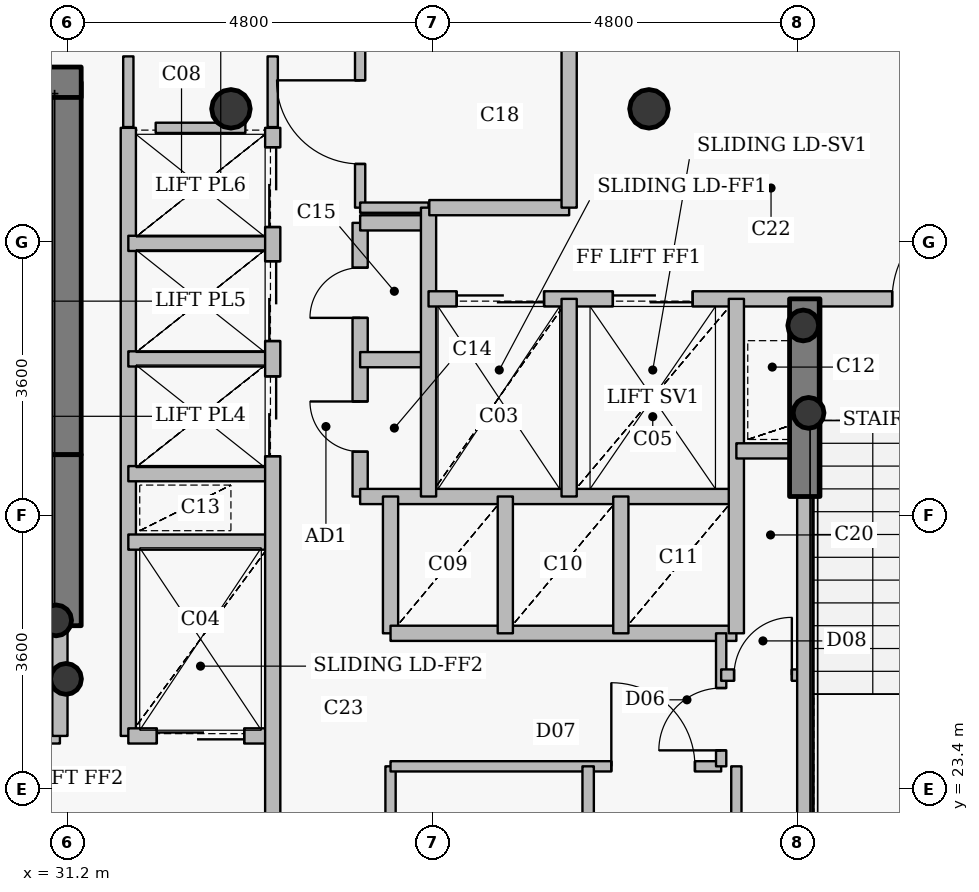
"""IFC4 building model, lengths in metres.
Left out: names, types, materials, properties, quantities, classifications, styles, units other than length and angle.
Written with IfcOpenShell. Run it as: python <this file> out.ifc"""

import sys

from ifc_helpers import new_model, si_unit, direction, frame, frame_2d, origin, origin_2d, place, context, subcontext, project, spatial, rectangle, hollow_circle, extrude, source, transform, mapped, element, fill, save


model = new_model("IFC4")
c1 = context("Model", 3, precision=1e-05, world=origin(), true_north=direction((0.0, 1.0)))
c2 = subcontext(c1, "Body", "Model", "MODEL_VIEW")
j1 = project(units=[si_unit("LENGTHUNIT", "METRE"), si_unit("PLANEANGLEUNIT", "RADIAN")], contexts=[c1])
p1 = place(None, origin())
s1 = spatial("IfcSite", under=j1, at=p1, CompositionType="ELEMENT")
p2 = place(p1, origin())
s2 = spatial("IfcBuilding", under=s1, at=p2, CompositionType="ELEMENT")
p3 = place(p2, frame((0.0, 0.0, 210.3)))
s3 = spatial("IfcBuildingStorey", under=s2, at=p3, CompositionType="ELEMENT", Elevation=210.3)
for number, where, z_axis, x_axis in (
    (1, (38.85, 32.35, 0.0), (0.0, 0.0, 1.0), (1.0, 0.0, 0.0)),
    (2, (33.35, 32.35, 0.0), (0.0, 0.0, 1.0), (1.0, 0.0, 0.0)),
):
    element("IfcColumn", number, at=place(p3, frame(where, z_axis=z_axis, x_axis=x_axis)), inside=s3, PredefinedType="COLUMN", context=c2, shape_type="SweptSolid", body=[
        extrude(hollow_circle(Radius=0.254, WallThickness=0.02, at=origin_2d()), origin(), (0.0, 0.0, 1.0), 3.75),
    ])
p4 = place(p3, frame((31.18, 27.8, 0.0), z_axis=(0.0, 0.0, 1.0), x_axis=(0.0, 1.0, 0.0)))
e3 = element("IfcWall", 3, at=p4, inside=s3, PredefinedType="SHEAR", context=c2, shape_type="SweptSolid", body=[
    extrude(rectangle(XDim=4.9, YDim=0.4, at=frame_2d((2.45, 0.0))), origin(), (0.0, 0.0, 1.0), 3.75),
])
p5 = place(p3, frame((27.28, 32.7, 0.0), z_axis=(0.0, 0.0, 1.0), x_axis=(1.0, 0.0, 0.0)))
e4 = element("IfcWall", 4, at=p5, inside=s3, PredefinedType="SHEAR", context=c2, shape_type="SweptSolid", body=[
    extrude(rectangle(XDim=4.1, YDim=0.4, at=frame_2d((2.05, 0.0))), origin(), (0.0, 0.0, 1.0), 3.75),
])
for number, where, z_axis, x_axis in (
    (5, (31.05, 25.62, 0.0), (0.0, 0.0, 1.0), (1.0, 0.0, 0.0)),
    (6, (31.18, 24.85, 0.0), (0.0, 0.0, 1.0), (1.0, 0.0, 0.0)),
    (7, (40.95, 28.35, 0.0), (0.0, 0.0, 1.0), (1.0, 0.0, 0.0)),
    (8, (40.88, 29.5, 0.0), (0.0, 0.0, 1.0), (1.0, 0.0, 0.0)),
):
    element("IfcColumn", number, at=place(p3, frame(where, z_axis=z_axis, x_axis=x_axis)), inside=s3, PredefinedType="COLUMN", context=c2, shape_type="SweptSolid", body=[
        extrude(hollow_circle(Radius=0.203, WallThickness=0.016, at=origin_2d()), origin(), (0.0, 0.0, 1.0), 3.75),
    ])
p6 = place(p3, frame((31.18, 25.55, 0.0), z_axis=(0.0, 0.0, 1.0), x_axis=(0.0, 1.0, 0.0)))
e9 = element("IfcWall", 9, at=p6, inside=s3, PredefinedType="SHEAR", context=c2, shape_type="SweptSolid", body=[
    extrude(rectangle(XDim=2.25, YDim=0.4, at=frame_2d((1.125, 0.0))), origin(), (0.0, 0.0, 1.0), 3.1),
])
p7 = place(p3, frame((40.9, 27.25, 0.0), z_axis=(0.0, 0.0, 1.0), x_axis=(0.0, 1.0, 0.0)))
e10 = element("IfcWall", 10, at=p7, inside=s3, PredefinedType="SHEAR", context=c2, shape_type="SweptSolid", body=[
    extrude(rectangle(XDim=2.6, YDim=0.4, at=frame_2d((1.3, 0.0))), origin(), (0.0, 0.0, 1.0), 3.1),
])
p8 = place(p3, frame((27.56, 24.1, 0.0), z_axis=(0.0, 0.0, 1.0), x_axis=(1.0, 0.0, 0.0)))
e11 = element("IfcWall", 11, at=p8, inside=s3, PredefinedType="PARTITIONING", context=c2, shape_type="SweptSolid", body=[
    extrude(rectangle(XDim=3.54, YDim=0.2, at=frame_2d((1.77, 0.0))), origin(), (0.0, 0.0, 1.0), 3.5),
])
p9 = place(p8, frame((1.17, 0.0, 0.0)))
e12 = element("IfcOpeningElement", 12, at=p9, cuts=e11, PredefinedType="OPENING", context=c2, shape_type="SweptSolid", body=[
    extrude(rectangle(XDim=1.2, YDim=2.15, at=origin_2d()), frame((0.6, 0.11, 1.075), z_axis=(0.0, -1.0, 0.0), x_axis=(1.0, 0.0, 0.0)), (0.0, 0.0, 1.0), 0.22),
])
p10 = place(p3, frame((31.1, 24.1, 0.0), z_axis=(0.0, 0.0, 1.0), x_axis=(0.0, 1.0, 0.0)))
e13 = element("IfcWall", 13, at=p10, inside=s3, PredefinedType="PARTITIONING", context=c2, shape_type="SweptSolid", body=[
    extrude(rectangle(XDim=1.44, YDim=0.2, at=frame_2d((0.72, 0.0))), origin(), (0.0, 0.0, 1.0), 3.5),
])
p11 = place(p3, frame((32.0, 24.1, 0.0), z_axis=(0.0, 0.0, 1.0), x_axis=(0.0, 1.0, 0.0)))
e14 = element("IfcWall", 14, at=p11, inside=s3, PredefinedType="PARTITIONING", context=c2, shape_type="SweptSolid", body=[
    extrude(rectangle(XDim=8.0, YDim=0.2, at=frame_2d((4.0, 0.0))), origin(), (0.0, 0.0, 1.0), 3.5),
])
p12 = place(p3, frame((32.0, 24.1, 0.0), z_axis=(0.0, 0.0, 1.0), x_axis=(1.0, 0.0, 0.0)))
e15 = element("IfcWall", 15, at=p12, inside=s3, PredefinedType="PARTITIONING", context=c2, shape_type="SweptSolid", body=[
    extrude(rectangle(XDim=1.9, YDim=0.2, at=frame_2d((0.95, 0.0))), origin(), (0.0, 0.0, 1.0), 3.085),
])
p13 = place(p12, frame((0.375, 0.0, 0.0)))
e16 = element("IfcOpeningElement", 16, at=p13, cuts=e15, PredefinedType="OPENING", context=c2, shape_type="SweptSolid", body=[
    extrude(rectangle(XDim=1.15, YDim=2.15, at=origin_2d()), frame((0.575, 0.11, 1.075), z_axis=(0.0, -1.0, 0.0), x_axis=(1.0, 0.0, 0.0)), (0.0, 0.0, 1.0), 0.22),
])
for number, where, z_axis, x_axis in (
    (17, (32.0, 26.65, 0.0), (0.0, 0.0, 1.0), (1.0, 0.0, 0.0)),
    (18, (32.0, 27.55, 0.0), (0.0, 0.0, 1.0), (1.0, 0.0, 0.0)),
    (19, (32.0, 29.06, 0.0), (0.0, 0.0, 1.0), (1.0, 0.0, 0.0)),
    (20, (32.0, 30.58, 0.0), (0.0, 0.0, 1.0), (1.0, 0.0, 0.0)),
):
    element("IfcWall", number, at=place(p3, frame(where, z_axis=z_axis, x_axis=x_axis)), inside=s3, PredefinedType="PARTITIONING", context=c2, shape_type="SweptSolid", body=[
        extrude(rectangle(XDim=1.9, YDim=0.2, at=frame_2d((0.95, 0.0))), origin(), (0.0, 0.0, 1.0), 3.085),
    ])
p14 = place(p3, frame((33.9, 20.7, 0.0), z_axis=(0.0, 0.0, 1.0), x_axis=(0.0, 1.0, 0.0)))
e21 = element("IfcWall", 21, at=p14, inside=s3, PredefinedType="PARTITIONING", context=c2, shape_type="SweptSolid", body=[
    extrude(rectangle(XDim=11.4, YDim=0.2, at=frame_2d((5.7, 0.0))), origin(), (0.0, 0.0, 1.0), 3.085),
])
p15 = place(p14, frame((7.08, 0.0, 0.0)))
e22 = element("IfcOpeningElement", 22, at=p15, cuts=e21, PredefinedType="OPENING", context=c2, shape_type="SweptSolid", body=[
    extrude(rectangle(XDim=1.05, YDim=2.15, at=origin_2d()), frame((0.525, 0.11, 1.075), z_axis=(0.0, -1.0, 0.0), x_axis=(1.0, 0.0, 0.0)), (0.0, 0.0, 1.0), 0.22),
])
p16 = place(p14, frame((8.595, 0.0, 0.0)))
e23 = element("IfcOpeningElement", 23, at=p16, cuts=e21, PredefinedType="OPENING", context=c2, shape_type="SweptSolid", body=[
    extrude(rectangle(XDim=1.05, YDim=2.15, at=origin_2d()), frame((0.525, 0.11, 1.075), z_axis=(0.0, -1.0, 0.0), x_axis=(1.0, 0.0, 0.0)), (0.0, 0.0, 1.0), 0.22),
])
p17 = place(p14, frame((10.095, 0.0, 0.0)))
e24 = element("IfcOpeningElement", 24, at=p17, cuts=e21, PredefinedType="OPENING", context=c2, shape_type="SweptSolid", body=[
    extrude(rectangle(XDim=1.05, YDim=2.15, at=origin_2d()), frame((0.525, 0.11, 1.075), z_axis=(0.0, -1.0, 0.0), x_axis=(1.0, 0.0, 0.0)), (0.0, 0.0, 1.0), 0.22),
])
p18 = place(p3, frame((35.05, 27.25, 0.0), z_axis=(0.0, 0.0, 1.0), x_axis=(0.0, 1.0, 0.0)))
e25 = element("IfcWall", 25, at=p18, inside=s3, PredefinedType="PARTITIONING", context=c2, shape_type="SweptSolid", body=[
    extrude(rectangle(XDim=3.6, YDim=0.2, at=frame_2d((1.8, 0.0))), origin(), (0.0, 0.0, 1.0), 3.5),
])
p19 = place(p18, frame((0.59, 0.0, 0.0)))
e26 = element("IfcOpeningElement", 26, at=p19, cuts=e25, PredefinedType="OPENING", context=c2, shape_type="SweptSolid", body=[
    extrude(rectangle(XDim=0.66, YDim=2.05, at=origin_2d()), frame((0.33, 0.11, 1.025), z_axis=(0.0, -1.0, 0.0), x_axis=(1.0, 0.0, 0.0)), (0.0, 0.0, 1.0), 0.22),
])
p20 = place(p18, frame((2.35, 0.0, 0.0)))
e27 = element("IfcOpeningElement", 27, at=p20, cuts=e25, PredefinedType="OPENING", context=c2, shape_type="SweptSolid", body=[
    extrude(rectangle(XDim=0.66, YDim=2.05, at=origin_2d()), frame((0.33, 0.11, 1.025), z_axis=(0.0, -1.0, 0.0), x_axis=(1.0, 0.0, 0.0)), (0.0, 0.0, 1.0), 0.22),
])
p21 = place(p3, frame((35.05, 27.25, 0.0), z_axis=(0.0, 0.0, 1.0), x_axis=(1.0, 0.0, 0.0)))
e28 = element("IfcWall", 28, at=p21, inside=s3, PredefinedType="PARTITIONING", context=c2, shape_type="SweptSolid", body=[
    extrude(rectangle(XDim=4.95, YDim=0.2, at=frame_2d((2.475, 0.0))), origin(), (0.0, 0.0, 1.0), 3.085),
])
for number, where, z_axis, x_axis in (
    (29, (35.05, 29.05, 0.0), (0.0, 0.0, 1.0), (1.0, 0.0, 0.0)),
    (30, (35.05, 30.85, 0.0), (0.0, 0.0, 1.0), (1.0, 0.0, 0.0)),
):
    element("IfcWall", number, at=place(p3, frame(where, z_axis=z_axis, x_axis=x_axis)), inside=s3, PredefinedType="PARTITIONING", context=c2, shape_type="SweptSolid", body=[
        extrude(rectangle(XDim=0.9, YDim=0.2, at=frame_2d((0.45, 0.0))), origin(), (0.0, 0.0, 1.0), 3.5),
    ])
p22 = place(p3, frame((35.05, 31.05, 0.0), z_axis=(0.0, 0.0, 1.0), x_axis=(0.0, 1.0, 0.0)))
e31 = element("IfcWall", 31, at=p22, inside=s3, PredefinedType="PARTITIONING", context=c2, shape_type="SweptSolid", body=[
    extrude(rectangle(XDim=2.25, YDim=0.2, at=frame_2d((1.125, 0.0))), origin(), (0.0, 0.0, 1.0), 3.085),
])
p23 = place(p3, frame((35.05, 31.05, 0.0), z_axis=(0.0, 0.0, 1.0), x_axis=(1.0, 0.0, 0.0)))
e32 = element("IfcWall", 32, at=p23, inside=s3, PredefinedType="PARTITIONING", context=c2, shape_type="SweptSolid", body=[
    extrude(rectangle(XDim=0.9, YDim=0.2, at=frame_2d((0.45, 0.0))), origin(), (0.0, 0.0, 1.0), 3.5),
])
p24 = place(p3, frame((35.45, 20.7, 0.0), z_axis=(0.0, 0.0, 1.0), x_axis=(0.0, 1.0, 0.0)))
e33 = element("IfcWall", 33, at=p24, inside=s3, PredefinedType="PARTITIONING", context=c2, shape_type="SweptSolid", body=[
    extrude(rectangle(XDim=3.0, YDim=0.135, at=frame_2d((1.5, 0.0))), origin(), (0.0, 0.0, 1.0), 3.085),
])
p25 = place(p3, frame((35.45, 23.7, 0.0), z_axis=(0.0, 0.0, 1.0), x_axis=(1.0, 0.0, 0.0)))
e34 = element("IfcWall", 34, at=p25, inside=s3, PredefinedType="PARTITIONING", context=c2, shape_type="SweptSolid", body=[
    extrude(rectangle(XDim=4.35, YDim=0.135, at=frame_2d((2.175, 0.0))), origin(), (0.0, 0.0, 1.0), 3.085),
])
p26 = place(p25, frame((1.625, 0.0, 0.0)))
e35 = element("IfcOpeningElement", 35, at=p26, cuts=e34, PredefinedType="OPENING", context=c2, shape_type="SweptSolid", body=[
    extrude(rectangle(XDim=1.1, YDim=2.15, at=origin_2d()), frame((0.55, 0.078, 1.075), z_axis=(0.0, -1.0, 0.0), x_axis=(1.0, 0.0, 0.0)), (0.0, 0.0, 1.0), 0.155),
])
p27 = place(p3, frame((35.45, 25.45, 0.0), z_axis=(0.0, 0.0, 1.0), x_axis=(0.0, 1.0, 0.0)))
e36 = element("IfcWall", 36, at=p27, inside=s3, PredefinedType="PARTITIONING", context=c2, shape_type="SweptSolid", body=[
    extrude(rectangle(XDim=1.8, YDim=0.2, at=frame_2d((0.9, 0.0))), origin(), (0.0, 0.0, 1.0), 3.5),
])
p28 = place(p3, frame((35.45, 25.45, 0.0), z_axis=(0.0, 0.0, 1.0), x_axis=(1.0, 0.0, 0.0)))
e37 = element("IfcWall", 37, at=p28, inside=s3, PredefinedType="PARTITIONING", context=c2, shape_type="SweptSolid", body=[
    extrude(rectangle(XDim=4.55, YDim=0.2, at=frame_2d((2.275, 0.0))), origin(), (0.0, 0.0, 1.0), 3.085),
])
p29 = place(p3, frame((35.95, 27.25, 0.0), z_axis=(0.0, 0.0, 1.0), x_axis=(0.0, 1.0, 0.0)))
e38 = element("IfcWall", 38, at=p29, inside=s3, PredefinedType="PARTITIONING", context=c2, shape_type="SweptSolid", body=[
    extrude(rectangle(XDim=3.8, YDim=0.2, at=frame_2d((1.9, 0.0))), origin(), (0.0, 0.0, 1.0), 3.5),
])
p30 = place(p3, frame((35.95, 29.85, 0.0), z_axis=(0.0, 0.0, 1.0), x_axis=(1.0, 0.0, 0.0)))
e39 = element("IfcWall", 39, at=p30, inside=s3, PredefinedType="PARTITIONING", context=c2, shape_type="SweptSolid", body=[
    extrude(rectangle(XDim=8.49, YDim=0.2, at=frame_2d((4.245, 0.0))), origin(), (0.0, 0.0, 1.0), 3.085),
])
p31 = place(p30, frame((6.1, 0.0, 0.0)))
e40 = element("IfcOpeningElement", 40, at=p31, cuts=e39, PredefinedType="OPENING", context=c2, shape_type="SweptSolid", body=[
    extrude(rectangle(XDim=1.2, YDim=2.15, at=origin_2d()), frame((0.6, 0.11, 1.075), z_axis=(0.0, -1.0, 0.0), x_axis=(1.0, 0.0, 0.0)), (0.0, 0.0, 1.0), 0.22),
])
p32 = place(p30, frame((0.37, 0.0, 0.0)))
e41 = element("IfcOpeningElement", 41, at=p32, cuts=e39, PredefinedType="OPENING", context=c2, shape_type="SweptSolid", body=[
    extrude(rectangle(XDim=1.15, YDim=2.15, at=origin_2d()), frame((0.575, 0.11, 1.075), z_axis=(0.0, -1.0, 0.0), x_axis=(1.0, 0.0, 0.0)), (0.0, 0.0, 1.0), 0.22),
])
p33 = place(p30, frame((2.425, 0.0, 0.0)))
e42 = element("IfcOpeningElement", 42, at=p33, cuts=e39, PredefinedType="OPENING", context=c2, shape_type="SweptSolid", body=[
    extrude(rectangle(XDim=1.05, YDim=2.15, at=origin_2d()), frame((0.525, 0.11, 1.075), z_axis=(0.0, -1.0, 0.0), x_axis=(1.0, 0.0, 0.0)), (0.0, 0.0, 1.0), 0.22),
])
p34 = place(p3, frame((36.96, 25.45, 0.0), z_axis=(0.0, 0.0, 1.0), x_axis=(0.0, 1.0, 0.0)))
e43 = element("IfcWall", 43, at=p34, inside=s3, PredefinedType="PARTITIONING", context=c2, shape_type="SweptSolid", body=[
    extrude(rectangle(XDim=1.8, YDim=0.2, at=frame_2d((0.9, 0.0))), origin(), (0.0, 0.0, 1.0), 3.5),
])
p35 = place(p3, frame((37.8, 27.25, 0.0), z_axis=(0.0, 0.0, 1.0), x_axis=(0.0, 1.0, 0.0)))
e44 = element("IfcWall", 44, at=p35, inside=s3, PredefinedType="PARTITIONING", context=c2, shape_type="SweptSolid", body=[
    extrude(rectangle(XDim=2.6, YDim=0.2, at=frame_2d((1.3, 0.0))), origin(), (0.0, 0.0, 1.0), 3.5),
])
p36 = place(p3, frame((38.48, 25.45, 0.0), z_axis=(0.0, 0.0, 1.0), x_axis=(0.0, 1.0, 0.0)))
e45 = element("IfcWall", 45, at=p36, inside=s3, PredefinedType="PARTITIONING", context=c2, shape_type="SweptSolid", body=[
    extrude(rectangle(XDim=1.8, YDim=0.2, at=frame_2d((0.9, 0.0))), origin(), (0.0, 0.0, 1.0), 3.5),
])
p37 = place(p3, frame((39.8, 23.7, 0.0), z_axis=(0.0, 0.0, 1.0), x_axis=(0.0, 1.0, 0.0)))
e46 = element("IfcWall", 46, at=p37, inside=s3, PredefinedType="PARTITIONING", context=c2, shape_type="SweptSolid", body=[
    extrude(rectangle(XDim=1.75, YDim=0.135, at=frame_2d((0.875, 0.0))), origin(), (0.0, 0.0, 1.0), 3.5),
])
p38 = place(p37, frame((0.465, 0.0, 0.0)))
e47 = element("IfcOpeningElement", 47, at=p38, cuts=e46, PredefinedType="OPENING", context=c2, shape_type="SweptSolid", body=[
    extrude(rectangle(XDim=0.82, YDim=2.1, at=origin_2d()), frame((0.41, 0.078, 1.05), z_axis=(0.0, -1.0, 0.0), x_axis=(1.0, 0.0, 0.0)), (0.0, 0.0, 1.0), 0.155),
])
p39 = place(p3, frame((40.0, 25.45, 0.0), z_axis=(0.0, 0.0, 1.0), x_axis=(0.0, 1.0, 0.0)))
e48 = element("IfcWall", 48, at=p39, inside=s3, PredefinedType="PARTITIONING", context=c2, shape_type="SweptSolid", body=[
    extrude(rectangle(XDim=4.4, YDim=0.2, at=frame_2d((2.2, 0.0))), origin(), (0.0, 0.0, 1.0), 3.5),
])
p40 = place(p3, frame((40.0, 27.85, 0.0), z_axis=(0.0, 0.0, 1.0), x_axis=(1.0, 0.0, 0.0)))
e49 = element("IfcWall", 49, at=p40, inside=s3, PredefinedType="PARTITIONING", context=c2, shape_type="SweptSolid", body=[
    extrude(rectangle(XDim=0.9, YDim=0.2, at=frame_2d((0.45, 0.0))), origin(), (0.0, 0.0, 1.0), 3.5),
])
p41 = place(p3, frame((40.9, 21.33, 0.0), z_axis=(0.0, 0.0, 1.0), x_axis=(0.0, 1.0, 0.0)))
e50 = element("IfcWall", 50, at=p41, inside=s3, PredefinedType="PARTITIONING", context=c2, shape_type="SweptSolid", body=[
    extrude(rectangle(XDim=5.91, YDim=0.2, at=frame_2d((2.955, 0.0))), origin(), (0.0, 0.0, 1.0), 3.035),
])
p42 = place(p3, frame((32.36, 32.1, 0.0), z_axis=(0.0, 0.0, 1.0), x_axis=(1.0, 0.0, 0.0)))
e51 = element("IfcWall", 51, at=p42, inside=s3, PredefinedType="PARTITIONING", context=c2, shape_type="SweptSolid", body=[
    extrude(rectangle(XDim=1.18, YDim=0.135, at=frame_2d((0.59, 0.0))), origin(), (0.0, 0.0, 1.0), 3.085),
])
p43 = place(p3, frame((40.0, 23.7, 0.0), z_axis=(0.0, 0.0, 1.0), x_axis=(0.0, -1.0, 0.0)))
e52 = element("IfcWall", 52, at=p43, inside=s3, PredefinedType="PARTITIONING", context=c2, shape_type="SweptSolid", body=[
    extrude(rectangle(XDim=2.74, YDim=0.135, at=frame_2d((1.37, 0.0))), origin(), (0.0, 0.0, 1.0), 3.035),
])
p44 = place(p3, frame((32.0, 33.04, 0.0), z_axis=(0.0, 0.0, 1.0), x_axis=(0.0, -1.0, 0.0)))
e53 = element("IfcWall", 53, at=p44, inside=s3, PredefinedType="PARTITIONING", context=c2, shape_type="SweptSolid", body=[
    extrude(rectangle(XDim=0.93, YDim=0.135, at=frame_2d((0.465, 0.0))), origin(), (0.0, 0.0, 1.0), 3.035),
])
p45 = place(p3, frame((33.9, 32.11, 0.0), z_axis=(0.0, 0.0, 1.0), x_axis=(0.0, 1.0, 0.0)))
e54 = element("IfcWall", 54, at=p45, inside=s3, PredefinedType="PARTITIONING", context=c2, shape_type="SweptSolid", body=[
    extrude(rectangle(XDim=0.93, YDim=0.135, at=frame_2d((0.465, 0.0))), origin(), (0.0, 0.0, 1.0), 3.085),
])
m1 = source(origin(), c2, "Body", "SweptSolid", [
    extrude(rectangle(XDim=1.2, YDim=2.15, at=origin_2d()), frame((0.6, 0.025, 1.075), z_axis=(0.0, -1.0, 0.0), x_axis=(1.0, 0.0, 0.0)), (0.0, 0.0, 1.0), 0.05),
])
p46 = place(p31, origin())
e55 = element("IfcDoor", 55, at=p46, inside=s3, OperationType="SINGLE_SWING_LEFT", PredefinedType="DOOR", context=c2, shape_type="MappedRepresentation", body=[
    mapped(m1, transform((0.0, 0.0, 0.0), x_axis=(1.0, 0.0, 0.0), y_axis=(0.0, 1.0, 0.0), z_axis=(0.0, 0.0, 1.0), scale=1.0)),
])
fill(e40, e55)
m2 = source(origin(), c2, "Body", "SweptSolid", [
    extrude(rectangle(XDim=1.15, YDim=2.15, at=origin_2d()), frame((0.575, 0.025, 1.075), z_axis=(0.0, -1.0, 0.0), x_axis=(1.0, 0.0, 0.0)), (0.0, 0.0, 1.0), 0.05),
])
p47 = place(p32, origin())
e56 = element("IfcDoor", 56, at=p47, inside=s3, OperationType="DOUBLE_DOOR_SLIDING", PredefinedType="USERDEFINED", context=c2, shape_type="MappedRepresentation", body=[
    mapped(m2, transform((0.0, 0.0, 0.0), x_axis=(1.0, 0.0, 0.0), y_axis=(0.0, 1.0, 0.0), z_axis=(0.0, 0.0, 1.0), scale=1.0)),
])
fill(e41, e56)
p48 = place(p13, origin())
e57 = element("IfcDoor", 57, at=p48, inside=s3, OperationType="DOUBLE_DOOR_SLIDING", PredefinedType="USERDEFINED", context=c2, shape_type="MappedRepresentation", body=[
    mapped(m2, transform((0.0, 0.0, 0.0), x_axis=(1.0, 0.0, 0.0), y_axis=(0.0, 1.0, 0.0), z_axis=(0.0, 0.0, 1.0), scale=1.0)),
])
fill(e16, e57)
m3 = source(origin(), c2, "Body", "SweptSolid", [
    extrude(rectangle(XDim=1.05, YDim=2.15, at=origin_2d()), frame((0.525, 0.025, 1.075), z_axis=(0.0, -1.0, 0.0), x_axis=(1.0, 0.0, 0.0)), (0.0, 0.0, 1.0), 0.05),
])
p49 = place(p33, origin())
e58 = element("IfcDoor", 58, at=p49, inside=s3, OperationType="DOUBLE_DOOR_SLIDING", PredefinedType="USERDEFINED", context=c2, shape_type="MappedRepresentation", body=[
    mapped(m3, transform((0.0, 0.0, 0.0), x_axis=(1.0, 0.0, 0.0), y_axis=(0.0, 1.0, 0.0), z_axis=(0.0, 0.0, 1.0), scale=1.0)),
])
fill(e42, e58)
p50 = place(p15, origin())
e59 = element("IfcDoor", 59, at=p50, inside=s3, OperationType="DOUBLE_DOOR_SLIDING", PredefinedType="USERDEFINED", context=c2, shape_type="MappedRepresentation", body=[
    mapped(m3, transform((0.0, 0.0, 0.0), x_axis=(1.0, 0.0, 0.0), y_axis=(0.0, 1.0, 0.0), z_axis=(0.0, 0.0, 1.0), scale=1.0)),
])
fill(e22, e59)
p51 = place(p16, origin())
e60 = element("IfcDoor", 60, at=p51, inside=s3, OperationType="DOUBLE_DOOR_SLIDING", PredefinedType="USERDEFINED", context=c2, shape_type="MappedRepresentation", body=[
    mapped(m3, transform((0.0, 0.0, 0.0), x_axis=(1.0, 0.0, 0.0), y_axis=(0.0, 1.0, 0.0), z_axis=(0.0, 0.0, 1.0), scale=1.0)),
])
fill(e23, e60)
p52 = place(p17, origin())
e61 = element("IfcDoor", 61, at=p52, inside=s3, OperationType="DOUBLE_DOOR_SLIDING", PredefinedType="USERDEFINED", context=c2, shape_type="MappedRepresentation", body=[
    mapped(m3, transform((0.0, 0.0, 0.0), x_axis=(1.0, 0.0, 0.0), y_axis=(0.0, 1.0, 0.0), z_axis=(0.0, 0.0, 1.0), scale=1.0)),
])
fill(e24, e61)
m4 = source(origin(), c2, "Body", "SweptSolid", [
    extrude(rectangle(XDim=0.66, YDim=2.05, at=origin_2d()), frame((0.33, 0.025, 1.025), z_axis=(0.0, -1.0, 0.0), x_axis=(1.0, 0.0, 0.0)), (0.0, 0.0, 1.0), 0.05),
])
p53 = place(p19, origin())
e62 = element("IfcDoor", 62, at=p53, inside=s3, OperationType="SINGLE_SWING_RIGHT", PredefinedType="USERDEFINED", context=c2, shape_type="MappedRepresentation", body=[
    mapped(m4, transform((0.0, 0.0, 0.0), x_axis=(1.0, 0.0, 0.0), y_axis=(0.0, 1.0, 0.0), z_axis=(0.0, 0.0, 1.0), scale=1.0)),
])
fill(e26, e62)
p54 = place(p20, origin())
e63 = element("IfcDoor", 63, at=p54, inside=s3, OperationType="SINGLE_SWING_LEFT", PredefinedType="USERDEFINED", context=c2, shape_type="MappedRepresentation", body=[
    mapped(m4, transform((0.0, 0.0, 0.0), x_axis=(1.0, 0.0, 0.0), y_axis=(0.0, 1.0, 0.0), z_axis=(0.0, 0.0, 1.0), scale=1.0)),
])
fill(e27, e63)
m5 = source(origin(), c2, "Body", "SweptSolid", [
    extrude(rectangle(XDim=1.1, YDim=2.15, at=origin_2d()), frame((0.55, 0.025, 1.075), z_axis=(0.0, -1.0, 0.0), x_axis=(1.0, 0.0, 0.0)), (0.0, 0.0, 1.0), 0.05),
])
p55 = place(p26, origin())
e64 = element("IfcDoor", 64, at=p55, inside=s3, OperationType="SINGLE_SWING_RIGHT", PredefinedType="DOOR", context=c2, shape_type="MappedRepresentation", body=[
    mapped(m5, transform((0.0, 0.0, 0.0), x_axis=(1.0, 0.0, 0.0), y_axis=(0.0, 1.0, 0.0), z_axis=(0.0, 0.0, 1.0), scale=1.0)),
])
fill(e35, e64)
m6 = source(origin(), c2, "Body", "SweptSolid", [
    extrude(rectangle(XDim=0.82, YDim=2.1, at=origin_2d()), frame((0.41, 0.025, 1.05), z_axis=(0.0, -1.0, 0.0), x_axis=(1.0, 0.0, 0.0)), (0.0, 0.0, 1.0), 0.05),
])
p56 = place(p38, origin())
e65 = element("IfcDoor", 65, at=p56, inside=s3, OperationType="SINGLE_SWING_LEFT", PredefinedType="DOOR", context=c2, shape_type="MappedRepresentation", body=[
    mapped(m6, transform((0.0, 0.0, 0.0), x_axis=(1.0, 0.0, 0.0), y_axis=(0.0, 1.0, 0.0), z_axis=(0.0, 0.0, 1.0), scale=1.0)),
])
fill(e47, e65)
save(model, sys.argv[1])
